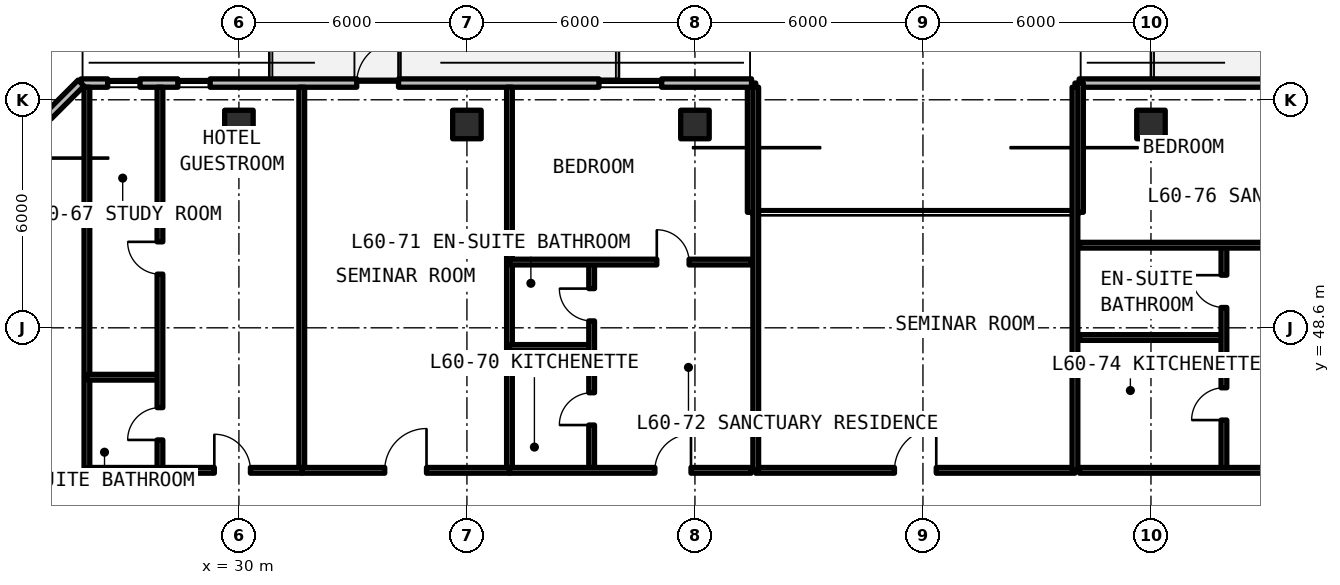
"""IFC4 building model, lengths in metres.
Left out: names, types, materials, properties, quantities, classifications, styles, units other than length and angle.
Written with IfcOpenShell. Run it as: python <this file> out.ifc"""

import sys

from ifc_helpers import new_model, si_unit, direction, frame, frame_2d, origin, origin_2d, place, context, subcontext, project, spatial, rectangle, extrude, element, fill, save


model = new_model("IFC4")
c1 = context("Model", 3, precision=1e-05, world=origin(), true_north=direction((0.0, 1.0)))
c2 = subcontext(c1, "Body", "Model", "MODEL_VIEW")
j1 = project(units=[si_unit("LENGTHUNIT", "METRE"), si_unit("PLANEANGLEUNIT", "RADIAN")], contexts=[c1])
p1 = place(None, origin())
s1 = spatial("IfcSite", under=j1, at=p1, CompositionType="ELEMENT")
p2 = place(p1, origin())
s2 = spatial("IfcBuilding", under=s1, at=p2, CompositionType="ELEMENT")
p3 = place(p2, frame((0.0, 0.0, 215.49)))
s3 = spatial("IfcBuildingStorey", under=s2, at=p3, CompositionType="ELEMENT", Elevation=215.49)
for number, where, z_axis, x_axis in (
    (1, (30.0, 53.95, 0.0), (0.0, 0.0, 1.0), (1.0, 0.0, 0.0)),
    (2, (36.0, 53.95, 0.0), (0.0, 0.0, 1.0), (1.0, 0.0, 0.0)),
    (3, (42.0, 53.95, 0.0), (0.0, 0.0, 1.0), (1.0, 0.0, 0.0)),
    (4, (54.0, 53.95, 0.0), (0.0, 0.0, 1.0), (1.0, 0.0, 0.0)),
):
    element("IfcColumn", number, at=place(p3, frame(where, z_axis=z_axis, x_axis=x_axis)), inside=s3, PredefinedType="COLUMN", context=c2, shape_type="SweptSolid", body=[
        extrude(rectangle(XDim=0.75, YDim=0.75, at=origin_2d()), origin(), (0.0, 0.0, 1.0), 3.63),
    ])
p4 = place(p3, frame((95.354, 55.04, 0.0), z_axis=(0.0, 0.0, 1.0), x_axis=(-1.0, 0.0, 0.0)))
e5 = element("IfcWall", 5, at=p4, inside=s3, PredefinedType="SOLIDWALL", context=c2, shape_type="SweptSolid", body=[
    extrude(rectangle(XDim=43.244, YDim=0.22, at=frame_2d((21.622, 0.0))), origin(), (0.0, 0.0, 1.0), 3.41),
])
p5 = place(p4, frame((37.204, 0.0, 0.0)))
e6 = element("IfcOpeningElement", 6, at=p5, cuts=e5, PredefinedType="OPENING", context=c2, shape_type="SweptSolid", body=[
    extrude(rectangle(XDim=1.1, YDim=2.15, at=frame_2d((0.55, 1.075))), frame((0.0, 0.12, 0.0), z_axis=(0.0, -1.0, 0.0), x_axis=(1.0, 0.0, 0.0)), (0.0, 0.0, 1.0), 0.24),
])
p6 = place(p4, frame((25.104, 0.0, 0.0)))
e7 = element("IfcOpeningElement", 7, at=p6, cuts=e5, PredefinedType="OPENING", context=c2, shape_type="SweptSolid", body=[
    extrude(rectangle(XDim=1.1, YDim=2.15, at=frame_2d((0.55, 1.075))), frame((0.0, 0.12, 0.0), z_axis=(0.0, -1.0, 0.0), x_axis=(1.0, 0.0, 0.0)), (0.0, 0.0, 1.0), 0.24),
])
p7 = place(p4, frame((14.804, 0.0, 0.0)))
e8 = element("IfcOpeningElement", 8, at=p7, cuts=e5, PredefinedType="OPENING", context=c2, shape_type="SweptSolid", body=[
    extrude(rectangle(XDim=1.1, YDim=2.15, at=frame_2d((0.55, 1.075))), frame((0.0, 0.12, 0.0), z_axis=(0.0, -1.0, 0.0), x_axis=(1.0, 0.0, 0.0)), (0.0, 0.0, 1.0), 0.24),
])
p8 = place(p4, frame((31.517, 0.0, 0.78)))
e9 = element("IfcOpeningElement", 9, at=p8, cuts=e5, PredefinedType="OPENING", context=c2, shape_type="SweptSolid", body=[
    extrude(rectangle(XDim=1.65, YDim=1.66, at=frame_2d((0.825, 0.83))), frame((0.0, 0.12, 0.0), z_axis=(0.0, -1.0, 0.0), x_axis=(1.0, 0.0, 0.0)), (0.0, 0.0, 1.0), 0.24),
])
p9 = place(p4, frame((8.932, 0.0, 0.78)))
e10 = element("IfcOpeningElement", 10, at=p9, cuts=e5, PredefinedType="OPENING", context=c2, shape_type="SweptSolid", body=[
    extrude(rectangle(XDim=1.65, YDim=1.66, at=frame_2d((0.825, 0.83))), frame((0.0, 0.12, 0.0), z_axis=(0.0, -1.0, 0.0), x_axis=(1.0, 0.0, 0.0)), (0.0, 0.0, 1.0), 0.24),
])
p10 = place(p4, frame((2.756, 0.0, 0.78)))
e11 = element("IfcOpeningElement", 11, at=p10, cuts=e5, PredefinedType="OPENING", context=c2, shape_type="SweptSolid", body=[
    extrude(rectangle(XDim=1.65, YDim=1.66, at=frame_2d((0.825, 0.83))), frame((0.0, 0.12, 0.0), z_axis=(0.0, -1.0, 0.0), x_axis=(1.0, 0.0, 0.0)), (0.0, 0.0, 1.0), 0.24),
])
for number, where, z_axis, x_axis in (
    (12, (52.11, 55.04, 0.0), (0.0, 0.0, 1.0), (0.0, -1.0, 0.0)),
    (13, (43.49, 51.64, 0.0), (0.0, 0.0, 1.0), (0.0, 1.0, 0.0)),
):
    element("IfcWall", number, at=place(p3, frame(where, z_axis=z_axis, x_axis=x_axis)), inside=s3, PredefinedType="SOLIDWALL", context=c2, shape_type="SweptSolid", body=[
        extrude(rectangle(XDim=3.4, YDim=0.22, at=frame_2d((1.7, 0.0))), origin(), (0.0, 0.0, 1.0), 3.41),
    ])
p11 = place(p3, frame((43.49, 55.04, 0.0), z_axis=(0.0, 0.0, 1.0), x_axis=(-1.0, 0.0, 0.0)))
e14 = element("IfcWall", 14, at=p11, inside=s3, PredefinedType="SOLIDWALL", context=c2, shape_type="SweptSolid", body=[
    extrude(rectangle(XDim=17.644, YDim=0.22, at=frame_2d((8.822, 0.0))), origin(), (0.0, 0.0, 1.0), 3.41),
])
p12 = place(p11, frame((9.29, 0.0, 0.0)))
e15 = element("IfcOpeningElement", 15, at=p12, cuts=e14, PredefinedType="OPENING", context=c2, shape_type="SweptSolid", body=[
    extrude(rectangle(XDim=1.1, YDim=2.15, at=frame_2d((0.55, 1.075))), frame((0.0, 0.12, 0.0), z_axis=(0.0, -1.0, 0.0), x_axis=(1.0, 0.0, 0.0)), (0.0, 0.0, 1.0), 0.24),
])
p13 = place(p11, frame((16.094, 0.0, 0.78)))
e16 = element("IfcOpeningElement", 16, at=p13, cuts=e14, PredefinedType="OPENING", context=c2, shape_type="SweptSolid", body=[
    extrude(rectangle(XDim=0.85, YDim=1.65, at=frame_2d((0.425, 0.825))), frame((0.0, 0.12, 0.0), z_axis=(0.0, -1.0, 0.0), x_axis=(1.0, 0.0, 0.0)), (0.0, 0.0, 1.0), 0.24),
])
p14 = place(p11, frame((14.247, 0.0, 0.78)))
e17 = element("IfcOpeningElement", 17, at=p14, cuts=e14, PredefinedType="OPENING", context=c2, shape_type="SweptSolid", body=[
    extrude(rectangle(XDim=0.85, YDim=1.65, at=frame_2d((0.425, 0.825))), frame((0.0, 0.12, 0.0), z_axis=(0.0, -1.0, 0.0), x_axis=(1.0, 0.0, 0.0)), (0.0, 0.0, 1.0), 0.24),
])
p15 = place(p11, frame((2.365, 0.0, 0.78)))
e18 = element("IfcOpeningElement", 18, at=p15, cuts=e14, PredefinedType="OPENING", context=c2, shape_type="SweptSolid", body=[
    extrude(rectangle(XDim=1.65, YDim=1.66, at=frame_2d((0.825, 0.83))), frame((0.0, 0.12, 0.0), z_axis=(0.0, -1.0, 0.0), x_axis=(1.0, 0.0, 0.0)), (0.0, 0.0, 1.0), 0.24),
])
p16 = place(p3, frame((25.846, 55.04, 0.0), z_axis=(0.0, 0.0, 1.0), x_axis=(-0.707106781187, -0.707106781187, 0.0)))
e19 = element("IfcWall", 19, at=p16, inside=s3, PredefinedType="SOLIDWALL", context=c2, shape_type="SweptSolid", body=[
    extrude(rectangle(XDim=5.849, YDim=0.22, at=frame_2d((2.924, 0.0))), origin(), (0.0, 0.0, 1.0), 3.41),
])
p17 = place(p16, frame((1.224, 0.0, 0.78)))
e20 = element("IfcOpeningElement", 20, at=p17, cuts=e19, PredefinedType="OPENING", context=c2, shape_type="SweptSolid", body=[
    extrude(rectangle(XDim=3.4, YDim=1.66, at=frame_2d((1.7, 0.83))), frame((0.0, 0.12, 0.0), z_axis=(0.0, -1.0, 0.0), x_axis=(1.0, 0.0, 0.0)), (0.0, 0.0, 1.0), 0.24),
])
p18 = place(p3, frame((43.6, 44.85, 0.0), z_axis=(0.0, 0.0, 1.0), x_axis=(1.0, 0.0, 0.0)))
e21 = element("IfcWall", 21, at=p18, inside=s3, PredefinedType="SOLIDWALL", context=c2, shape_type="SweptSolid", body=[
    extrude(rectangle(XDim=8.4, YDim=0.15, at=frame_2d((4.2, 0.0))), origin(), (0.0, 0.0, 1.0), 2.63),
])
p19 = place(p18, frame((3.65, 0.0, 0.0)))
e22 = element("IfcOpeningElement", 22, at=p19, cuts=e21, PredefinedType="OPENING", context=c2, shape_type="SweptSolid", body=[
    extrude(rectangle(XDim=1.1, YDim=2.15, at=frame_2d((0.55, 1.075))), frame((0.0, 0.085, 0.0), z_axis=(0.0, -1.0, 0.0), x_axis=(1.0, 0.0, 0.0)), (0.0, 0.0, 1.0), 0.17),
])
for number, where, z_axis, x_axis in (
    (23, (43.6, 44.85, 0.0), (0.0, 0.0, 1.0), (0.0, 1.0, 0.0)),
    (24, (52.0, 44.85, 0.0), (0.0, 0.0, 1.0), (0.0, 1.0, 0.0)),
    (25, (26.0, 44.85, 0.0), (0.0, 0.0, 1.0), (0.0, 1.0, 0.0)),
    (26, (31.654, 44.85, 0.0), (0.0, 0.0, 1.0), (0.0, 1.0, 0.0)),
):
    element("IfcWall", number, at=place(p3, frame(where, z_axis=z_axis, x_axis=x_axis)), inside=s3, PredefinedType="SOLIDWALL", context=c2, shape_type="SweptSolid", body=[
        extrude(rectangle(XDim=10.08, YDim=0.15, at=frame_2d((5.04, 0.0))), origin(), (0.0, 0.0, 1.0), 2.63),
    ])
p20 = place(p3, frame((26.0, 47.3, 0.0), z_axis=(0.0, 0.0, 1.0), x_axis=(1.0, 0.0, 0.0)))
e27 = element("IfcWall", 27, at=p20, inside=s3, PredefinedType="PARTITIONING", context=c2, shape_type="SweptSolid", body=[
    extrude(rectangle(XDim=1.922, YDim=0.15, at=frame_2d((0.961, 0.0))), origin(), (0.0, 0.0, 1.0), 2.63),
])
p21 = place(p3, frame((27.922, 44.85, 0.0), z_axis=(0.0, 0.0, 1.0), x_axis=(0.0, 1.0, 0.0)))
e28 = element("IfcWall", 28, at=p21, inside=s3, PredefinedType="PARTITIONING", context=c2, shape_type="SweptSolid", body=[
    extrude(rectangle(XDim=10.08, YDim=0.15, at=frame_2d((5.04, 0.0))), origin(), (0.0, 0.0, 1.0), 2.63),
])
p22 = place(p21, frame((0.8, 0.0, 0.0)))
e29 = element("IfcOpeningElement", 29, at=p22, cuts=e28, PredefinedType="OPENING", context=c2, shape_type="SweptSolid", body=[
    extrude(rectangle(XDim=0.85, YDim=2.1, at=frame_2d((0.425, 1.05))), frame((0.0, 0.085, 0.0), z_axis=(0.0, -1.0, 0.0), x_axis=(1.0, 0.0, 0.0)), (0.0, 0.0, 1.0), 0.17),
])
p23 = place(p21, frame((5.162, 0.0, 0.0)))
e30 = element("IfcOpeningElement", 30, at=p23, cuts=e28, PredefinedType="OPENING", context=c2, shape_type="SweptSolid", body=[
    extrude(rectangle(XDim=0.85, YDim=2.1, at=frame_2d((0.425, 1.05))), frame((0.0, 0.085, 0.0), z_axis=(0.0, -1.0, 0.0), x_axis=(1.0, 0.0, 0.0)), (0.0, 0.0, 1.0), 0.17),
])
p24 = place(p3, frame((26.0, 44.85, 0.0), z_axis=(0.0, 0.0, 1.0), x_axis=(1.0, 0.0, 0.0)))
e31 = element("IfcWall", 31, at=p24, inside=s3, PredefinedType="SOLIDWALL", context=c2, shape_type="SweptSolid", body=[
    extrude(rectangle(XDim=5.654, YDim=0.15, at=frame_2d((2.827, 0.0))), origin(), (0.0, 0.0, 1.0), 2.63),
])
p25 = place(p24, frame((3.353, 0.0, 0.0)))
e32 = element("IfcOpeningElement", 32, at=p25, cuts=e31, PredefinedType="OPENING", context=c2, shape_type="SweptSolid", body=[
    extrude(rectangle(XDim=0.95, YDim=2.15, at=frame_2d((0.475, 1.075))), frame((0.0, 0.085, 0.0), z_axis=(0.0, -1.0, 0.0), x_axis=(1.0, 0.0, 0.0)), (0.0, 0.0, 1.0), 0.17),
])
p26 = place(p3, frame((37.119, 44.85, 0.0), z_axis=(0.0, 0.0, 1.0), x_axis=(0.0, 1.0, 0.0)))
e33 = element("IfcWall", 33, at=p26, inside=s3, PredefinedType="SOLIDWALL", context=c2, shape_type="SweptSolid", body=[
    extrude(rectangle(XDim=10.08, YDim=0.15, at=frame_2d((5.04, 0.0))), origin(), (0.0, 0.0, 1.0), 2.63),
])
p27 = place(p3, frame((31.654, 44.85, 0.0), z_axis=(0.0, 0.0, 1.0), x_axis=(1.0, 0.0, 0.0)))
e34 = element("IfcWall", 34, at=p27, inside=s3, PredefinedType="SOLIDWALL", context=c2, shape_type="SweptSolid", body=[
    extrude(rectangle(XDim=5.466, YDim=0.15, at=frame_2d((2.733, 0.0))), origin(), (0.0, 0.0, 1.0), 2.63),
])
p28 = place(p27, frame((2.183, 0.0, 0.0)))
e35 = element("IfcOpeningElement", 35, at=p28, cuts=e34, PredefinedType="OPENING", context=c2, shape_type="SweptSolid", body=[
    extrude(rectangle(XDim=1.1, YDim=2.15, at=frame_2d((0.55, 1.075))), frame((0.0, 0.085, 0.0), z_axis=(0.0, -1.0, 0.0), x_axis=(1.0, 0.0, 0.0)), (0.0, 0.0, 1.0), 0.17),
])
p29 = place(p3, frame((37.119, 48.083, 0.0), z_axis=(0.0, 0.0, 1.0), x_axis=(1.0, 0.0, 0.0)))
e36 = element("IfcWall", 36, at=p29, inside=s3, PredefinedType="PARTITIONING", context=c2, shape_type="SweptSolid", body=[
    extrude(rectangle(XDim=2.163, YDim=0.15, at=frame_2d((1.081, 0.0))), origin(), (0.0, 0.0, 1.0), 2.63),
])
p30 = place(p3, frame((39.282, 44.85, 0.0), z_axis=(0.0, 0.0, 1.0), x_axis=(0.0, 1.0, 0.0)))
e37 = element("IfcWall", 37, at=p30, inside=s3, PredefinedType="PARTITIONING", context=c2, shape_type="SweptSolid", body=[
    extrude(rectangle(XDim=5.48, YDim=0.15, at=frame_2d((2.74, 0.0))), origin(), (0.0, 0.0, 1.0), 2.63),
])
p31 = place(p30, frame((1.192, 0.0, 0.0)))
e38 = element("IfcOpeningElement", 38, at=p31, cuts=e37, PredefinedType="OPENING", context=c2, shape_type="SweptSolid", body=[
    extrude(rectangle(XDim=0.85, YDim=2.1, at=frame_2d((0.425, 1.05))), frame((0.0, 0.085, 0.0), z_axis=(0.0, -1.0, 0.0), x_axis=(1.0, 0.0, 0.0)), (0.0, 0.0, 1.0), 0.17),
])
p32 = place(p30, frame((3.932, 0.0, 0.0)))
e39 = element("IfcOpeningElement", 39, at=p32, cuts=e37, PredefinedType="OPENING", context=c2, shape_type="SweptSolid", body=[
    extrude(rectangle(XDim=0.85, YDim=2.1, at=frame_2d((0.425, 1.05))), frame((0.0, 0.085, 0.0), z_axis=(0.0, -1.0, 0.0), x_axis=(1.0, 0.0, 0.0)), (0.0, 0.0, 1.0), 0.17),
])
p33 = place(p3, frame((37.119, 50.33, 0.0), z_axis=(0.0, 0.0, 1.0), x_axis=(1.0, 0.0, 0.0)))
e40 = element("IfcWall", 40, at=p33, inside=s3, PredefinedType="PARTITIONING", context=c2, shape_type="SweptSolid", body=[
    extrude(rectangle(XDim=6.361, YDim=0.15, at=frame_2d((3.18, 0.0))), origin(), (0.0, 0.0, 1.0), 2.63),
])
p34 = place(p33, frame((3.877, 0.0, 0.0)))
e41 = element("IfcOpeningElement", 41, at=p34, cuts=e40, PredefinedType="OPENING", context=c2, shape_type="SweptSolid", body=[
    extrude(rectangle(XDim=0.85, YDim=2.1, at=frame_2d((0.425, 1.05))), frame((0.0, 0.085, 0.0), z_axis=(0.0, -1.0, 0.0), x_axis=(1.0, 0.0, 0.0)), (0.0, 0.0, 1.0), 0.17),
])
p35 = place(p3, frame((37.119, 44.85, 0.0), z_axis=(0.0, 0.0, 1.0), x_axis=(1.0, 0.0, 0.0)))
e42 = element("IfcWall", 42, at=p35, inside=s3, PredefinedType="SOLIDWALL", context=c2, shape_type="SweptSolid", body=[
    extrude(rectangle(XDim=6.361, YDim=0.15, at=frame_2d((3.18, 0.0))), origin(), (0.0, 0.0, 1.0), 2.63),
])
p36 = place(p35, frame((3.827, 0.0, 0.0)))
e43 = element("IfcOpeningElement", 43, at=p36, cuts=e42, PredefinedType="OPENING", context=c2, shape_type="SweptSolid", body=[
    extrude(rectangle(XDim=0.95, YDim=2.15, at=frame_2d((0.475, 1.075))), frame((0.0, 0.085, 0.0), z_axis=(0.0, -1.0, 0.0), x_axis=(1.0, 0.0, 0.0)), (0.0, 0.0, 1.0), 0.17),
])
p37 = place(p3, frame((52.12, 48.345, 0.0), z_axis=(0.0, 0.0, 1.0), x_axis=(1.0, 0.0, 0.0)))
e44 = element("IfcWall", 44, at=p37, inside=s3, PredefinedType="PARTITIONING", context=c2, shape_type="SweptSolid", body=[
    extrude(rectangle(XDim=3.8, YDim=0.15, at=frame_2d((1.9, 0.0))), origin(), (0.0, 0.0, 1.0), 2.63),
])
p38 = place(p3, frame((55.92, 44.85, 0.0), z_axis=(0.0, 0.0, 1.0), x_axis=(0.0, 1.0, 0.0)))
e45 = element("IfcWall", 45, at=p38, inside=s3, PredefinedType="PARTITIONING", context=c2, shape_type="SweptSolid", body=[
    extrude(rectangle(XDim=5.924, YDim=0.15, at=frame_2d((2.962, 0.0))), origin(), (0.0, 0.0, 1.0), 2.63),
])
p39 = place(p38, frame((1.323, 0.0, 0.0)))
e46 = element("IfcOpeningElement", 46, at=p39, cuts=e45, PredefinedType="OPENING", context=c2, shape_type="SweptSolid", body=[
    extrude(rectangle(XDim=0.85, YDim=2.1, at=frame_2d((0.425, 1.05))), frame((0.0, 0.085, 0.0), z_axis=(0.0, -1.0, 0.0), x_axis=(1.0, 0.0, 0.0)), (0.0, 0.0, 1.0), 0.17),
])
p40 = place(p38, frame((4.285, 0.0, 0.0)))
e47 = element("IfcOpeningElement", 47, at=p40, cuts=e45, PredefinedType="OPENING", context=c2, shape_type="SweptSolid", body=[
    extrude(rectangle(XDim=0.85, YDim=2.1, at=frame_2d((0.425, 1.05))), frame((0.0, 0.085, 0.0), z_axis=(0.0, -1.0, 0.0), x_axis=(1.0, 0.0, 0.0)), (0.0, 0.0, 1.0), 0.17),
])
p41 = place(p3, frame((52.12, 50.774, 0.0), z_axis=(0.0, 0.0, 1.0), x_axis=(1.0, 0.0, 0.0)))
e48 = element("IfcWall", 48, at=p41, inside=s3, PredefinedType="PARTITIONING", context=c2, shape_type="SweptSolid", body=[
    extrude(rectangle(XDim=7.098, YDim=0.15, at=frame_2d((3.549, 0.0))), origin(), (0.0, 0.0, 1.0), 2.63),
])
p42 = place(p41, frame((5.064, 0.0, 0.0)))
e49 = element("IfcOpeningElement", 49, at=p42, cuts=e48, PredefinedType="OPENING", context=c2, shape_type="SweptSolid", body=[
    extrude(rectangle(XDim=0.85, YDim=2.1, at=frame_2d((0.425, 1.05))), frame((0.0, 0.085, 0.0), z_axis=(0.0, -1.0, 0.0), x_axis=(1.0, 0.0, 0.0)), (0.0, 0.0, 1.0), 0.17),
])
p43 = place(p3, frame((52.12, 44.85, 0.0), z_axis=(0.0, 0.0, 1.0), x_axis=(1.0, 0.0, 0.0)))
e50 = element("IfcWall", 50, at=p43, inside=s3, PredefinedType="SOLIDWALL", context=c2, shape_type="SweptSolid", body=[
    extrude(rectangle(XDim=7.098, YDim=0.15, at=frame_2d((3.549, 0.0))), origin(), (0.0, 0.0, 1.0), 2.63),
])
p44 = place(p43, frame((5.014, 0.0, 0.0)))
e51 = element("IfcOpeningElement", 51, at=p44, cuts=e50, PredefinedType="OPENING", context=c2, shape_type="SweptSolid", body=[
    extrude(rectangle(XDim=0.95, YDim=2.15, at=frame_2d((0.475, 1.075))), frame((0.0, 0.085, 0.0), z_axis=(0.0, -1.0, 0.0), x_axis=(1.0, 0.0, 0.0)), (0.0, 0.0, 1.0), 0.17),
])
p45 = place(p12, frame((1.1, 0.0, 0.0), z_axis=(0.0, 0.0, 1.0), x_axis=(-1.0, 0.0, 0.0)))
e52 = element("IfcDoor", 52, at=p45, inside=s3, OperationType="SINGLE_SWING_LEFT", PredefinedType="DOOR", context=c2, shape_type="SweptSolid", body=[
    extrude(rectangle(XDim=1.1, YDim=2.15, at=frame_2d((0.55, 1.075))), frame((0.0, 0.025, 0.0), z_axis=(0.0, -1.0, 0.0), x_axis=(1.0, 0.0, 0.0)), (0.0, 0.0, 1.0), 0.05),
])
fill(e15, e52)
p46 = place(p13, origin())
e53 = element("IfcWindow", 53, at=p46, inside=s3, PartitioningType="SINGLE_PANEL", PredefinedType="WINDOW", context=c2, shape_type="SweptSolid", body=[
    extrude(rectangle(XDim=0.85, YDim=1.65, at=frame_2d((0.425, 0.825))), frame((0.0, 0.03, 0.0), z_axis=(0.0, -1.0, 0.0), x_axis=(1.0, 0.0, 0.0)), (0.0, 0.0, 1.0), 0.06),
])
fill(e16, e53)
p47 = place(p14, origin())
e54 = element("IfcWindow", 54, at=p47, inside=s3, PartitioningType="SINGLE_PANEL", PredefinedType="WINDOW", context=c2, shape_type="SweptSolid", body=[
    extrude(rectangle(XDim=0.85, YDim=1.65, at=frame_2d((0.425, 0.825))), frame((0.0, 0.03, 0.0), z_axis=(0.0, -1.0, 0.0), x_axis=(1.0, 0.0, 0.0)), (0.0, 0.0, 1.0), 0.06),
])
fill(e17, e54)
p48 = place(p15, origin())
e55 = element("IfcWindow", 55, at=p48, inside=s3, PartitioningType="SINGLE_PANEL", PredefinedType="WINDOW", context=c2, shape_type="SweptSolid", body=[
    extrude(rectangle(XDim=1.65, YDim=1.66, at=frame_2d((0.825, 0.83))), frame((0.0, 0.03, 0.0), z_axis=(0.0, -1.0, 0.0), x_axis=(1.0, 0.0, 0.0)), (0.0, 0.0, 1.0), 0.06),
])
fill(e18, e55)
p49 = place(p19, origin())
e56 = element("IfcDoor", 56, at=p49, inside=s3, OperationType="SINGLE_SWING_RIGHT", PredefinedType="DOOR", context=c2, shape_type="SweptSolid", body=[
    extrude(rectangle(XDim=1.1, YDim=2.15, at=frame_2d((0.55, 1.075))), frame((0.0, 0.025, 0.0), z_axis=(0.0, -1.0, 0.0), x_axis=(1.0, 0.0, 0.0)), (0.0, 0.0, 1.0), 0.05),
])
fill(e22, e56)
p50 = place(p22, origin())
e57 = element("IfcDoor", 57, at=p50, inside=s3, OperationType="SINGLE_SWING_LEFT", PredefinedType="DOOR", context=c2, shape_type="SweptSolid", body=[
    extrude(rectangle(XDim=0.85, YDim=2.1, at=frame_2d((0.425, 1.05))), frame((0.0, 0.025, 0.0), z_axis=(0.0, -1.0, 0.0), x_axis=(1.0, 0.0, 0.0)), (0.0, 0.0, 1.0), 0.05),
])
fill(e29, e57)
p51 = place(p23, origin())
e58 = element("IfcDoor", 58, at=p51, inside=s3, OperationType="SINGLE_SWING_RIGHT", PredefinedType="DOOR", context=c2, shape_type="SweptSolid", body=[
    extrude(rectangle(XDim=0.85, YDim=2.1, at=frame_2d((0.425, 1.05))), frame((0.0, 0.025, 0.0), z_axis=(0.0, -1.0, 0.0), x_axis=(1.0, 0.0, 0.0)), (0.0, 0.0, 1.0), 0.05),
])
fill(e30, e58)
p52 = place(p25, origin())
e59 = element("IfcDoor", 59, at=p52, inside=s3, OperationType="SINGLE_SWING_LEFT", PredefinedType="DOOR", context=c2, shape_type="SweptSolid", body=[
    extrude(rectangle(XDim=0.95, YDim=2.15, at=frame_2d((0.475, 1.075))), frame((0.0, 0.025, 0.0), z_axis=(0.0, -1.0, 0.0), x_axis=(1.0, 0.0, 0.0)), (0.0, 0.0, 1.0), 0.05),
])
fill(e32, e59)
p53 = place(p28, origin())
e60 = element("IfcDoor", 60, at=p53, inside=s3, OperationType="SINGLE_SWING_RIGHT", PredefinedType="DOOR", context=c2, shape_type="SweptSolid", body=[
    extrude(rectangle(XDim=1.1, YDim=2.15, at=frame_2d((0.55, 1.075))), frame((0.0, 0.025, 0.0), z_axis=(0.0, -1.0, 0.0), x_axis=(1.0, 0.0, 0.0)), (0.0, 0.0, 1.0), 0.05),
])
fill(e35, e60)
p54 = place(p31, origin())
e61 = element("IfcDoor", 61, at=p54, inside=s3, OperationType="SINGLE_SWING_LEFT", PredefinedType="DOOR", context=c2, shape_type="SweptSolid", body=[
    extrude(rectangle(XDim=0.85, YDim=2.1, at=frame_2d((0.425, 1.05))), frame((0.0, 0.025, 0.0), z_axis=(0.0, -1.0, 0.0), x_axis=(1.0, 0.0, 0.0)), (0.0, 0.0, 1.0), 0.05),
])
fill(e38, e61)
p55 = place(p32, origin())
e62 = element("IfcDoor", 62, at=p55, inside=s3, OperationType="SINGLE_SWING_RIGHT", PredefinedType="DOOR", context=c2, shape_type="SweptSolid", body=[
    extrude(rectangle(XDim=0.85, YDim=2.1, at=frame_2d((0.425, 1.05))), frame((0.0, 0.025, 0.0), z_axis=(0.0, -1.0, 0.0), x_axis=(1.0, 0.0, 0.0)), (0.0, 0.0, 1.0), 0.05),
])
fill(e39, e62)
p56 = place(p34, origin())
e63 = element("IfcDoor", 63, at=p56, inside=s3, OperationType="SINGLE_SWING_LEFT", PredefinedType="DOOR", context=c2, shape_type="SweptSolid", body=[
    extrude(rectangle(XDim=0.85, YDim=2.1, at=frame_2d((0.425, 1.05))), frame((0.0, 0.025, 0.0), z_axis=(0.0, -1.0, 0.0), x_axis=(1.0, 0.0, 0.0)), (0.0, 0.0, 1.0), 0.05),
])
fill(e41, e63)
p57 = place(p36, origin())
e64 = element("IfcDoor", 64, at=p57, inside=s3, OperationType="SINGLE_SWING_RIGHT", PredefinedType="DOOR", context=c2, shape_type="SweptSolid", body=[
    extrude(rectangle(XDim=0.95, YDim=2.15, at=frame_2d((0.475, 1.075))), frame((0.0, 0.025, 0.0), z_axis=(0.0, -1.0, 0.0), x_axis=(1.0, 0.0, 0.0)), (0.0, 0.0, 1.0), 0.05),
])
fill(e43, e64)
p58 = place(p39, origin())
e65 = element("IfcDoor", 65, at=p58, inside=s3, OperationType="SINGLE_SWING_LEFT", PredefinedType="DOOR", context=c2, shape_type="SweptSolid", body=[
    extrude(rectangle(XDim=0.85, YDim=2.1, at=frame_2d((0.425, 1.05))), frame((0.0, 0.025, 0.0), z_axis=(0.0, -1.0, 0.0), x_axis=(1.0, 0.0, 0.0)), (0.0, 0.0, 1.0), 0.05),
])
fill(e46, e65)
p59 = place(p40, origin())
e66 = element("IfcDoor", 66, at=p59, inside=s3, OperationType="SINGLE_SWING_RIGHT", PredefinedType="DOOR", context=c2, shape_type="SweptSolid", body=[
    extrude(rectangle(XDim=0.85, YDim=2.1, at=frame_2d((0.425, 1.05))), frame((0.0, 0.025, 0.0), z_axis=(0.0, -1.0, 0.0), x_axis=(1.0, 0.0, 0.0)), (0.0, 0.0, 1.0), 0.05),
])
fill(e47, e66)
save(model, sys.argv[1])
